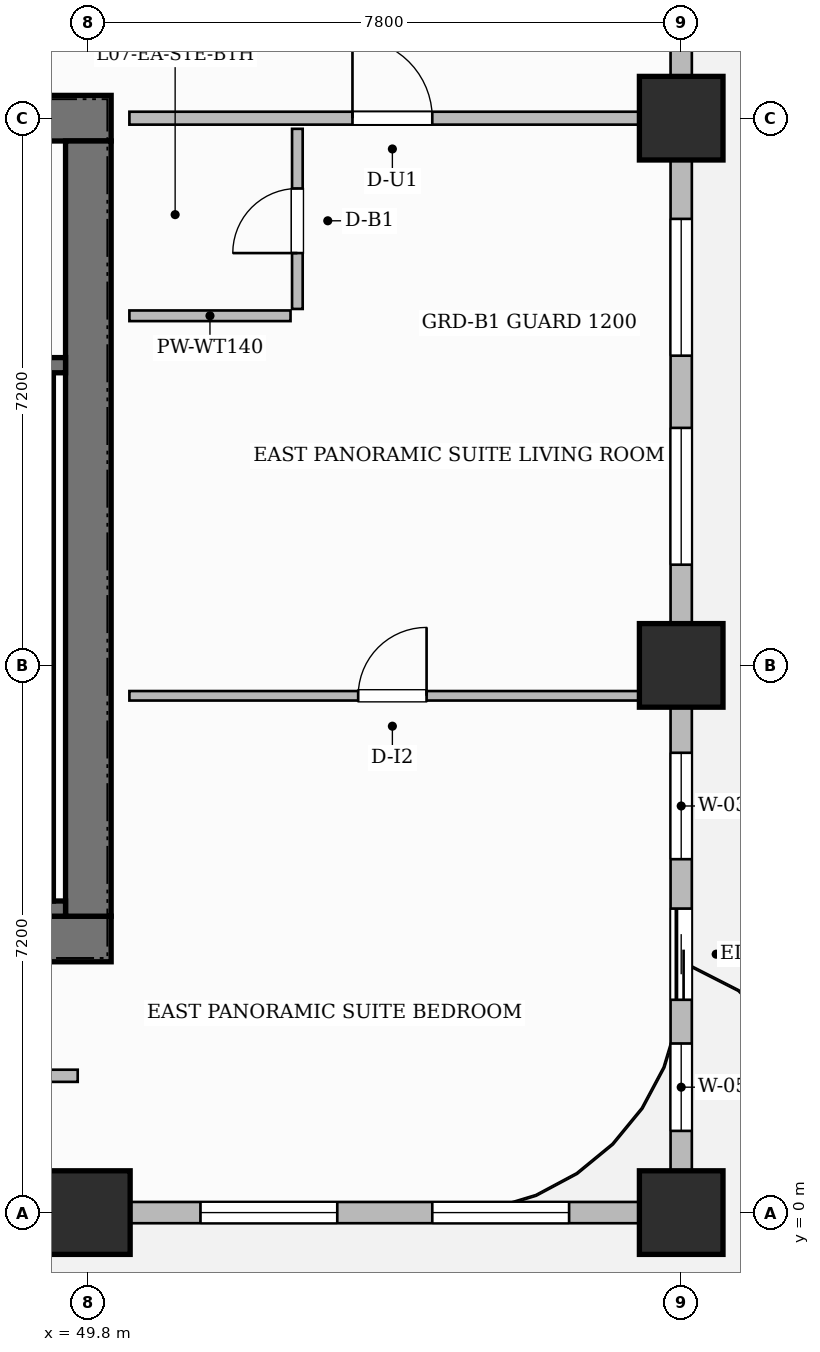
"""IFC4 building model, lengths in metres.
Left out: names, types, materials, properties, quantities, classifications, styles, units other than length and angle.
Written with IfcOpenShell. Run it as: python <this file> out.ifc"""

import sys

from ifc_helpers import new_model, si_unit, direction, frame, frame_2d, origin, origin_2d, place, context, subcontext, project, spatial, rectangle, extrude, source, transform, mapped, element, fill, save


model = new_model("IFC4")
c1 = context("Model", 3, precision=1e-05, world=origin(), true_north=direction((0.0, 1.0)))
c2 = subcontext(c1, "Body", "Model", "MODEL_VIEW")
j1 = project(units=[si_unit("LENGTHUNIT", "METRE"), si_unit("PLANEANGLEUNIT", "RADIAN")], contexts=[c1])
p1 = place(None, origin())
s1 = spatial("IfcSite", under=j1, at=p1, CompositionType="ELEMENT")
p2 = place(p1, origin())
s2 = spatial("IfcBuilding", under=s1, at=p2, CompositionType="ELEMENT")
p3 = place(p2, frame((0.0, 0.0, 36.1)))
s3 = spatial("IfcBuildingStorey", under=s2, at=p3, CompositionType="ELEMENT", Elevation=36.1)
p4 = place(p3, frame((34.5, 3.6, 0.0), z_axis=(0.0, 0.0, 1.0), x_axis=(1.0, 0.0, 0.0)))
e1 = element("IfcWall", 1, at=p4, inside=s3, PredefinedType="SHEAR", context=c2, shape_type="SweptSolid", body=[
    extrude(rectangle(XDim=15.6, YDim=0.6, at=frame_2d((7.8, 0.0))), origin(), (0.0, 0.0, 1.0), 3.7),
])
p5 = place(p4, frame((4.13, 0.0, 0.0)))
e2 = element("IfcOpeningElement", 2, at=p5, cuts=e1, PredefinedType="OPENING", context=c2, shape_type="SweptSolid", body=[
    extrude(rectangle(XDim=0.9, YDim=2.1, at=frame_2d((0.45, 1.05))), frame((0.0, 0.31, 0.0), z_axis=(0.0, -1.0, 0.0), x_axis=(1.0, 0.0, 0.0)), (0.0, 0.0, 1.0), 0.62),
])
p6 = place(p4, frame((5.7, 0.0, 0.0)))
e3 = element("IfcOpeningElement", 3, at=p6, cuts=e1, PredefinedType="OPENING", context=c2, shape_type="SweptSolid", body=[
    extrude(rectangle(XDim=0.9, YDim=2.1, at=frame_2d((0.45, 1.05))), frame((0.0, 0.31, 0.0), z_axis=(0.0, -1.0, 0.0), x_axis=(1.0, 0.0, 0.0)), (0.0, 0.0, 1.0), 0.62),
])
p7 = place(p4, frame((7.3, 0.0, 0.0)))
e4 = element("IfcOpeningElement", 4, at=p7, cuts=e1, PredefinedType="OPENING", context=c2, shape_type="SweptSolid", body=[
    extrude(rectangle(XDim=0.9, YDim=2.1, at=frame_2d((0.45, 1.05))), frame((0.0, 0.31, 0.0), z_axis=(0.0, -1.0, 0.0), x_axis=(1.0, 0.0, 0.0)), (0.0, 0.0, 1.0), 0.62),
])
p8 = place(p3, frame((34.5, 14.4, 0.0), z_axis=(0.0, 0.0, 1.0), x_axis=(1.0, 0.0, 0.0)))
e5 = element("IfcWall", 5, at=p8, inside=s3, PredefinedType="SHEAR", context=c2, shape_type="SweptSolid", body=[
    extrude(rectangle(XDim=15.6, YDim=0.6, at=frame_2d((7.8, 0.0))), origin(), (0.0, 0.0, 1.0), 3.7),
])
p9 = place(p8, frame((5.43, 0.0, 0.0)))
e6 = element("IfcOpeningElement", 6, at=p9, cuts=e5, PredefinedType="OPENING", context=c2, shape_type="SweptSolid", body=[
    extrude(rectangle(XDim=1.5, YDim=2.2, at=frame_2d((0.75, 1.1))), frame((0.0, 0.31, 0.0), z_axis=(0.0, -1.0, 0.0), x_axis=(1.0, 0.0, 0.0)), (0.0, 0.0, 1.0), 0.62),
])
p10 = place(p8, frame((1.645, 0.0, 0.0)))
e7 = element("IfcOpeningElement", 7, at=p10, cuts=e5, PredefinedType="OPENING", context=c2, shape_type="SweptSolid", body=[
    extrude(rectangle(XDim=1.05, YDim=2.15, at=frame_2d((0.525, 1.075))), frame((0.0, 0.31, 0.0), z_axis=(0.0, -1.0, 0.0), x_axis=(1.0, 0.0, 0.0)), (0.0, 0.0, 1.0), 0.62),
])
p11 = place(p8, frame((11.275, 0.0, 0.0)))
e8 = element("IfcOpeningElement", 8, at=p11, cuts=e5, PredefinedType="OPENING", context=c2, shape_type="SweptSolid", body=[
    extrude(rectangle(XDim=1.05, YDim=2.15, at=frame_2d((0.525, 1.075))), frame((0.0, 0.31, 0.0), z_axis=(0.0, -1.0, 0.0), x_axis=(1.0, 0.0, 0.0)), (0.0, 0.0, 1.0), 0.62),
])
p12 = place(p3, frame((49.8, 3.9, 0.0), z_axis=(0.0, 0.0, 1.0), x_axis=(0.0, 1.0, 0.0)))
e9 = element("IfcWall", 9, at=p12, inside=s3, PredefinedType="SHEAR", context=c2, shape_type="SweptSolid", body=[
    extrude(rectangle(XDim=10.2, YDim=0.6, at=frame_2d((5.1, 0.0))), origin(), (0.0, 0.0, 1.0), 3.7),
])
m1 = source(origin(), c2, "Body", "SweptSolid", [
    extrude(rectangle(XDim=1.1, YDim=1.1, at=origin_2d()), origin(), (0.0, 0.0, 1.0), 3.7),
])
for number, where, z_axis, x_axis in (
    (10, (49.8, 0.0, 0.0), (0.0, 0.0, 1.0), (1.0, 0.0, 0.0)),
    (11, (57.6, 0.0, 0.0), (0.0, 0.0, 1.0), (1.0, 0.0, 0.0)),
    (12, (57.6, 7.2, 0.0), (0.0, 0.0, 1.0), (1.0, 0.0, 0.0)),
    (13, (57.6, 14.4, 0.0), (0.0, 0.0, 1.0), (1.0, 0.0, 0.0)),
):
    element("IfcColumn", number, at=place(p3, frame(where, z_axis=z_axis, x_axis=x_axis)), inside=s3, PredefinedType="COLUMN", context=c2, shape_type="MappedRepresentation", body=[
        mapped(m1, transform((0.0, 0.0, 0.0), scale=1.0)),
    ])
p13 = place(p3, frame((43.12, 4.0, 0.0), z_axis=(0.0, 0.0, 1.0), x_axis=(1.0, 0.0, 0.0)))
e14 = element("IfcWall", 14, at=p13, inside=s3, PredefinedType="SHEAR", context=c2, shape_type="SweptSolid", body=[
    extrude(rectangle(XDim=6.38, YDim=0.2, at=frame_2d((3.19, 0.0))), origin(), (0.0, 0.0, 1.0), 3.7),
])
p14 = place(p3, frame((49.24, 4.1, 0.0), z_axis=(0.0, 0.0, 1.0), x_axis=(0.0, 1.0, 0.0)))
e15 = element("IfcWall", 15, at=p14, inside=s3, PredefinedType="SHEAR", context=c2, shape_type="SweptSolid", body=[
    extrude(rectangle(XDim=6.95, YDim=0.2, at=frame_2d((3.475, 0.0))), origin(), (0.0, 0.0, 1.0), 3.7),
])
p15 = place(p3, frame((43.12, 11.15, 0.0), z_axis=(0.0, 0.0, 1.0), x_axis=(1.0, 0.0, 0.0)))
e16 = element("IfcWall", 16, at=p15, inside=s3, PredefinedType="SHEAR", context=c2, shape_type="SweptSolid", body=[
    extrude(rectangle(XDim=6.38, YDim=0.2, at=frame_2d((3.19, 0.0))), origin(), (0.0, 0.0, 1.0), 3.7),
])
p16 = place(p15, frame((1.045, 0.0, 0.0)))
e17 = element("IfcOpeningElement", 17, at=p16, cuts=e16, PredefinedType="OPENING", context=c2, shape_type="SweptSolid", body=[
    extrude(rectangle(XDim=1.05, YDim=2.2, at=frame_2d((0.525, 1.1))), frame((0.0, 0.11, 0.0), z_axis=(0.0, -1.0, 0.0), x_axis=(1.0, 0.0, 0.0)), (0.0, 0.0, 1.0), 0.22),
])
p17 = place(p15, frame((4.125, 0.0, 0.0)))
e18 = element("IfcOpeningElement", 18, at=p17, cuts=e16, PredefinedType="OPENING", context=c2, shape_type="SweptSolid", body=[
    extrude(rectangle(XDim=1.05, YDim=2.2, at=frame_2d((0.525, 1.1))), frame((0.0, 0.11, 0.0), z_axis=(0.0, -1.0, 0.0), x_axis=(1.0, 0.0, 0.0)), (0.0, 0.0, 1.0), 0.22),
])
p18 = place(p3, frame((30.29, 1.8, 0.0), z_axis=(0.0, 0.0, 1.0), x_axis=(1.0, 0.0, 0.0)))
e19 = element("IfcWall", 19, at=p18, inside=s3, PredefinedType="PARTITIONING", context=c2, shape_type="SweptSolid", body=[
    extrude(rectangle(XDim=19.37, YDim=0.16, at=frame_2d((9.685, 0.0))), origin(), (0.0, 0.0, 1.0), 3.45),
])
p19 = place(p18, frame((9.735, 0.0, 0.0)))
e20 = element("IfcOpeningElement", 20, at=p19, cuts=e19, PredefinedType="OPENING", context=c2, shape_type="SweptSolid", body=[
    extrude(rectangle(XDim=0.95, YDim=2.15, at=frame_2d((0.475, 1.075))), frame((0.0, 0.09, 0.0), z_axis=(0.0, -1.0, 0.0), x_axis=(1.0, 0.0, 0.0)), (0.0, 0.0, 1.0), 0.18),
])
p20 = place(p3, frame((50.34, 14.4, 0.0), z_axis=(0.0, 0.0, 1.0), x_axis=(1.0, 0.0, 0.0)))
e21 = element("IfcWall", 21, at=p20, inside=s3, PredefinedType="PARTITIONING", context=c2, shape_type="SweptSolid", body=[
    extrude(rectangle(XDim=7.07, YDim=0.17, at=frame_2d((3.535, 0.0))), origin(), (0.0, 0.0, 1.0), 2.885),
])
p21 = place(p20, frame((2.935, 0.0, 0.0)))
e22 = element("IfcOpeningElement", 22, at=p21, cuts=e21, PredefinedType="OPENING", context=c2, shape_type="SweptSolid", body=[
    extrude(rectangle(XDim=1.05, YDim=2.25, at=frame_2d((0.525, 1.125))), frame((0.0, 0.095, 0.0), z_axis=(0.0, -1.0, 0.0), x_axis=(1.0, 0.0, 0.0)), (0.0, 0.0, 1.0), 0.19),
])
p22 = place(p3, frame((52.55, 11.89, 0.0), z_axis=(0.0, 0.0, 1.0), x_axis=(0.0, 1.0, 0.0)))
e23 = element("IfcWall", 23, at=p22, inside=s3, PredefinedType="PARTITIONING", context=c2, shape_type="SweptSolid", body=[
    extrude(rectangle(XDim=2.37, YDim=0.14, at=frame_2d((1.185, 0.0))), origin(), (0.0, 0.0, 1.0), 3.45),
])
p23 = place(p22, frame((0.735, 0.0, 0.0)))
e24 = element("IfcOpeningElement", 24, at=p23, cuts=e23, PredefinedType="OPENING", context=c2, shape_type="SweptSolid", body=[
    extrude(rectangle(XDim=0.85, YDim=2.1, at=frame_2d((0.425, 1.05))), frame((0.0, 0.08, 0.0), z_axis=(0.0, -1.0, 0.0), x_axis=(1.0, 0.0, 0.0)), (0.0, 0.0, 1.0), 0.16),
])
p24 = place(p3, frame((50.34, 11.8, 0.0), z_axis=(0.0, 0.0, 1.0), x_axis=(1.0, 0.0, 0.0)))
e25 = element("IfcWall", 25, at=p24, inside=s3, PredefinedType="PARTITIONING", context=c2, shape_type="SweptSolid", body=[
    extrude(rectangle(XDim=2.12, YDim=0.14, at=frame_2d((1.06, 0.0))), origin(), (0.0, 0.0, 1.0), 3.45),
])
p25 = place(p3, frame((50.34, 6.8, 0.0), z_axis=(0.0, 0.0, 1.0), x_axis=(1.0, 0.0, 0.0)))
e26 = element("IfcWall", 26, at=p25, inside=s3, PredefinedType="PARTITIONING", context=c2, shape_type="SweptSolid", body=[
    extrude(rectangle(XDim=7.07, YDim=0.125, at=frame_2d((3.535, 0.0))), origin(), (0.0, 0.0, 1.0), 3.45),
])
p26 = place(p25, frame((3.01, 0.0, 0.0)))
e27 = element("IfcOpeningElement", 27, at=p26, cuts=e26, PredefinedType="OPENING", context=c2, shape_type="SweptSolid", body=[
    extrude(rectangle(XDim=0.9, YDim=2.15, at=frame_2d((0.45, 1.075))), frame((0.0, 0.073, 0.0), z_axis=(0.0, -1.0, 0.0), x_axis=(1.0, 0.0, 0.0)), (0.0, 0.0, 1.0), 0.145),
])
p27 = place(p3, frame((14.4, 0.0, 0.0), z_axis=(0.0, 0.0, 1.0), x_axis=(1.0, 0.0, 0.0)))
e28 = element("IfcWall", 28, at=p27, inside=s3, PredefinedType="SOLIDWALL", context=c2, shape_type="SweptSolid", body=[
    extrude(rectangle(XDim=43.2, YDim=0.28, at=frame_2d((21.6, 0.0))), origin(), (0.0, 0.0, 1.0), 2.885),
])
p28 = place(p27, frame((1.5, 0.0, 0.0)))
e29 = element("IfcOpeningElement", 29, at=p28, cuts=e28, PredefinedType="OPENING", context=c2, shape_type="SweptSolid", body=[
    extrude(rectangle(XDim=1.2, YDim=2.2, at=frame_2d((0.6, 1.1))), frame((0.0, 0.15, 0.0), z_axis=(0.0, -1.0, 0.0), x_axis=(1.0, 0.0, 0.0)), (0.0, 0.0, 1.0), 0.3),
])
p29 = place(p27, frame((3.336, 0.0, 0.8)))
e30 = element("IfcOpeningElement", 30, at=p29, cuts=e28, PredefinedType="OPENING", context=c2, shape_type="SweptSolid", body=[
    extrude(rectangle(XDim=1.4, YDim=1.85, at=frame_2d((0.7, 0.925))), frame((0.0, 0.15, 0.0), z_axis=(0.0, -1.0, 0.0), x_axis=(1.0, 0.0, 0.0)), (0.0, 0.0, 1.0), 0.3),
])
p30 = place(p27, frame((5.269, 0.0, 0.8)))
e31 = element("IfcOpeningElement", 31, at=p30, cuts=e28, PredefinedType="OPENING", context=c2, shape_type="SweptSolid", body=[
    extrude(rectangle(XDim=0.95, YDim=1.75, at=frame_2d((0.475, 0.875))), frame((0.0, 0.15, 0.0), z_axis=(0.0, -1.0, 0.0), x_axis=(1.0, 0.0, 0.0)), (0.0, 0.0, 1.0), 0.3),
])
p31 = place(p27, frame((8.389, 0.0, 0.8)))
e32 = element("IfcOpeningElement", 32, at=p31, cuts=e28, PredefinedType="OPENING", context=c2, shape_type="SweptSolid", body=[
    extrude(rectangle(XDim=1.8, YDim=1.85, at=frame_2d((0.9, 0.925))), frame((0.0, 0.15, 0.0), z_axis=(0.0, -1.0, 0.0), x_axis=(1.0, 0.0, 0.0)), (0.0, 0.0, 1.0), 0.3),
])
p32 = place(p27, frame((11.197, 0.0, 0.8)))
e33 = element("IfcOpeningElement", 33, at=p32, cuts=e28, PredefinedType="OPENING", context=c2, shape_type="SweptSolid", body=[
    extrude(rectangle(XDim=1.8, YDim=1.85, at=frame_2d((0.9, 0.925))), frame((0.0, 0.15, 0.0), z_axis=(0.0, -1.0, 0.0), x_axis=(1.0, 0.0, 0.0)), (0.0, 0.0, 1.0), 0.3),
])
p33 = place(p27, frame((16.804, 0.0, 0.8)))
e34 = element("IfcOpeningElement", 34, at=p33, cuts=e28, PredefinedType="OPENING", context=c2, shape_type="SweptSolid", body=[
    extrude(rectangle(XDim=1.8, YDim=1.85, at=frame_2d((0.9, 0.925))), frame((0.0, 0.15, 0.0), z_axis=(0.0, -1.0, 0.0), x_axis=(1.0, 0.0, 0.0)), (0.0, 0.0, 1.0), 0.3),
])
p34 = place(p27, frame((21.725, 0.0, 0.8)))
e35 = element("IfcOpeningElement", 35, at=p34, cuts=e28, PredefinedType="OPENING", context=c2, shape_type="SweptSolid", body=[
    extrude(rectangle(XDim=1.8, YDim=1.85, at=frame_2d((0.9, 0.925))), frame((0.0, 0.15, 0.0), z_axis=(0.0, -1.0, 0.0), x_axis=(1.0, 0.0, 0.0)), (0.0, 0.0, 1.0), 0.3),
])
p35 = place(p27, frame((24.475, 0.0, 0.8)))
e36 = element("IfcOpeningElement", 36, at=p35, cuts=e28, PredefinedType="OPENING", context=c2, shape_type="SweptSolid", body=[
    extrude(rectangle(XDim=1.8, YDim=1.85, at=frame_2d((0.9, 0.925))), frame((0.0, 0.15, 0.0), z_axis=(0.0, -1.0, 0.0), x_axis=(1.0, 0.0, 0.0)), (0.0, 0.0, 1.0), 0.3),
])
p36 = place(p27, frame((29.075, 0.0, 0.8)))
e37 = element("IfcOpeningElement", 37, at=p36, cuts=e28, PredefinedType="OPENING", context=c2, shape_type="SweptSolid", body=[
    extrude(rectangle(XDim=1.8, YDim=1.85, at=frame_2d((0.9, 0.925))), frame((0.0, 0.15, 0.0), z_axis=(0.0, -1.0, 0.0), x_axis=(1.0, 0.0, 0.0)), (0.0, 0.0, 1.0), 0.3),
])
p37 = place(p27, frame((32.125, 0.0, 0.8)))
e38 = element("IfcOpeningElement", 38, at=p37, cuts=e28, PredefinedType="OPENING", context=c2, shape_type="SweptSolid", body=[
    extrude(rectangle(XDim=1.8, YDim=1.85, at=frame_2d((0.9, 0.925))), frame((0.0, 0.15, 0.0), z_axis=(0.0, -1.0, 0.0), x_axis=(1.0, 0.0, 0.0)), (0.0, 0.0, 1.0), 0.3),
])
p38 = place(p27, frame((36.875, 0.0, 0.8)))
e39 = element("IfcOpeningElement", 39, at=p38, cuts=e28, PredefinedType="OPENING", context=c2, shape_type="SweptSolid", body=[
    extrude(rectangle(XDim=1.8, YDim=1.85, at=frame_2d((0.9, 0.925))), frame((0.0, 0.15, 0.0), z_axis=(0.0, -1.0, 0.0), x_axis=(1.0, 0.0, 0.0)), (0.0, 0.0, 1.0), 0.3),
])
p39 = place(p27, frame((39.925, 0.0, 0.8)))
e40 = element("IfcOpeningElement", 40, at=p39, cuts=e28, PredefinedType="OPENING", context=c2, shape_type="SweptSolid", body=[
    extrude(rectangle(XDim=1.8, YDim=1.85, at=frame_2d((0.9, 0.925))), frame((0.0, 0.15, 0.0), z_axis=(0.0, -1.0, 0.0), x_axis=(1.0, 0.0, 0.0)), (0.0, 0.0, 1.0), 0.3),
])
p40 = place(p3, frame((57.6, 0.05, 0.0), z_axis=(0.0, 0.0, 1.0), x_axis=(0.0, 1.0, 0.0)))
e41 = element("IfcWall", 41, at=p40, inside=s3, PredefinedType="SOLIDWALL", context=c2, shape_type="SweptSolid", body=[
    extrude(rectangle(XDim=21.5, YDim=0.28, at=frame_2d((10.75, 0.0))), origin(), (0.0, 0.0, 1.0), 2.885),
])
p41 = place(p40, frame((2.75, 0.0, 0.0)))
e42 = element("IfcOpeningElement", 42, at=p41, cuts=e41, PredefinedType="OPENING", context=c2, shape_type="SweptSolid", body=[
    extrude(rectangle(XDim=1.2, YDim=2.2, at=frame_2d((0.6, 1.1))), frame((0.0, 0.15, 0.0), z_axis=(0.0, -1.0, 0.0), x_axis=(1.0, 0.0, 0.0)), (0.0, 0.0, 1.0), 0.3),
])
p42 = place(p40, frame((1.025, 0.0, 0.8)))
e43 = element("IfcOpeningElement", 43, at=p42, cuts=e41, PredefinedType="OPENING", context=c2, shape_type="SweptSolid", body=[
    extrude(rectangle(XDim=1.15, YDim=1.8, at=frame_2d((0.575, 0.9))), frame((0.0, 0.15, 0.0), z_axis=(0.0, -1.0, 0.0), x_axis=(1.0, 0.0, 0.0)), (0.0, 0.0, 1.0), 0.3),
])
p43 = place(p40, frame((4.6, 0.0, 0.8)))
e44 = element("IfcOpeningElement", 44, at=p43, cuts=e41, PredefinedType="OPENING", context=c2, shape_type="SweptSolid", body=[
    extrude(rectangle(XDim=1.4, YDim=1.85, at=frame_2d((0.7, 0.925))), frame((0.0, 0.15, 0.0), z_axis=(0.0, -1.0, 0.0), x_axis=(1.0, 0.0, 0.0)), (0.0, 0.0, 1.0), 0.3),
])
p44 = place(p40, frame((8.475, 0.0, 0.8)))
e45 = element("IfcOpeningElement", 45, at=p44, cuts=e41, PredefinedType="OPENING", context=c2, shape_type="SweptSolid", body=[
    extrude(rectangle(XDim=1.8, YDim=1.85, at=frame_2d((0.9, 0.925))), frame((0.0, 0.15, 0.0), z_axis=(0.0, -1.0, 0.0), x_axis=(1.0, 0.0, 0.0)), (0.0, 0.0, 1.0), 0.3),
])
p45 = place(p40, frame((11.225, 0.0, 0.8)))
e46 = element("IfcOpeningElement", 46, at=p45, cuts=e41, PredefinedType="OPENING", context=c2, shape_type="SweptSolid", body=[
    extrude(rectangle(XDim=1.8, YDim=1.85, at=frame_2d((0.9, 0.925))), frame((0.0, 0.15, 0.0), z_axis=(0.0, -1.0, 0.0), x_axis=(1.0, 0.0, 0.0)), (0.0, 0.0, 1.0), 0.3),
])
p46 = place(p40, frame((17.679, 0.0, 0.8)))
e47 = element("IfcOpeningElement", 47, at=p46, cuts=e41, PredefinedType="OPENING", context=c2, shape_type="SweptSolid", body=[
    extrude(rectangle(XDim=1.8, YDim=1.85, at=frame_2d((0.9, 0.925))), frame((0.0, 0.15, 0.0), z_axis=(0.0, -1.0, 0.0), x_axis=(1.0, 0.0, 0.0)), (0.0, 0.0, 1.0), 0.3),
])
m2 = source(origin(), c2, "Body", "SweptSolid", [
    extrude(rectangle(XDim=1.05, YDim=2.25, at=frame_2d((0.525, 1.125))), frame((0.0, 0.025, 0.0), z_axis=(0.0, -1.0, 0.0), x_axis=(1.0, 0.0, 0.0)), (0.0, 0.0, 1.0), 0.05),
])
p47 = place(p21, origin())
e48 = element("IfcDoor", 48, at=p47, inside=s3, OperationType="SINGLE_SWING_LEFT", PredefinedType="DOOR", context=c2, shape_type="MappedRepresentation", body=[
    mapped(m2, transform((0.0, 0.0, 0.0), scale=1.0)),
])
fill(e22, e48)
m3 = source(origin(), c2, "Body", "SweptSolid", [
    extrude(rectangle(XDim=0.85, YDim=2.1, at=frame_2d((0.425, 1.05))), frame((0.0, 0.025, 0.0), z_axis=(0.0, -1.0, 0.0), x_axis=(1.0, 0.0, 0.0)), (0.0, 0.0, 1.0), 0.05),
])
p48 = place(p23, origin())
e49 = element("IfcDoor", 49, at=p48, inside=s3, OperationType="SINGLE_SWING_LEFT", PredefinedType="DOOR", context=c2, shape_type="MappedRepresentation", body=[
    mapped(m3, transform((0.0, 0.0, 0.0), scale=1.0)),
])
fill(e24, e49)
m4 = source(origin(), c2, "Body", "SweptSolid", [
    extrude(rectangle(XDim=0.9, YDim=2.15, at=frame_2d((0.45, 1.075))), frame((0.0, 0.025, 0.0), z_axis=(0.0, -1.0, 0.0), x_axis=(1.0, 0.0, 0.0)), (0.0, 0.0, 1.0), 0.05),
])
p49 = place(p26, origin())
e50 = element("IfcDoor", 50, at=p49, inside=s3, OperationType="SINGLE_SWING_RIGHT", PredefinedType="DOOR", context=c2, shape_type="MappedRepresentation", body=[
    mapped(m4, transform((0.0, 0.0, 0.0), scale=1.0)),
])
fill(e27, e50)
m5 = source(origin(), c2, "Body", "SweptSolid", [
    extrude(rectangle(XDim=1.2, YDim=2.2, at=frame_2d((0.6, 1.1))), frame((0.0, 0.025, 0.0), z_axis=(0.0, -1.0, 0.0), x_axis=(1.0, 0.0, 0.0)), (0.0, 0.0, 1.0), 0.05),
])
p50 = place(p41, origin())
e51 = element("IfcDoor", 51, at=p50, inside=s3, OperationType="SLIDING_TO_LEFT", PredefinedType="DOOR", context=c2, shape_type="MappedRepresentation", body=[
    mapped(m5, transform((0.0, 0.0, 0.0), scale=1.0)),
])
fill(e42, e51)
m6 = source(origin(), c2, "Body", "SweptSolid", [
    extrude(rectangle(XDim=1.8, YDim=1.85, at=frame_2d((0.9, 0.925))), frame((0.0, 0.03, 0.0), z_axis=(0.0, -1.0, 0.0), x_axis=(1.0, 0.0, 0.0)), (0.0, 0.0, 1.0), 0.06),
])
p51 = place(p38, origin())
e52 = element("IfcWindow", 52, at=p51, inside=s3, PartitioningType="DOUBLE_PANEL_VERTICAL", PredefinedType="WINDOW", context=c2, shape_type="MappedRepresentation", body=[
    mapped(m6, transform((0.0, 0.0, 0.0), scale=1.0)),
])
fill(e39, e52)
p52 = place(p39, origin())
e53 = element("IfcWindow", 53, at=p52, inside=s3, PartitioningType="DOUBLE_PANEL_VERTICAL", PredefinedType="WINDOW", context=c2, shape_type="MappedRepresentation", body=[
    mapped(m6, transform((0.0, 0.0, 0.0), scale=1.0)),
])
fill(e40, e53)
m7 = source(origin(), c2, "Body", "SweptSolid", [
    extrude(rectangle(XDim=1.15, YDim=1.8, at=frame_2d((0.575, 0.9))), frame((0.0, 0.03, 0.0), z_axis=(0.0, -1.0, 0.0), x_axis=(1.0, 0.0, 0.0)), (0.0, 0.0, 1.0), 0.06),
])
p53 = place(p42, origin())
e54 = element("IfcWindow", 54, at=p53, inside=s3, PartitioningType="SINGLE_PANEL", PredefinedType="WINDOW", context=c2, shape_type="MappedRepresentation", body=[
    mapped(m7, transform((0.0, 0.0, 0.0), scale=1.0)),
])
fill(e43, e54)
m8 = source(origin(), c2, "Body", "SweptSolid", [
    extrude(rectangle(XDim=1.4, YDim=1.85, at=frame_2d((0.7, 0.925))), frame((0.0, 0.03, 0.0), z_axis=(0.0, -1.0, 0.0), x_axis=(1.0, 0.0, 0.0)), (0.0, 0.0, 1.0), 0.06),
])
p54 = place(p43, origin())
e55 = element("IfcWindow", 55, at=p54, inside=s3, PartitioningType="SINGLE_PANEL", PredefinedType="WINDOW", context=c2, shape_type="MappedRepresentation", body=[
    mapped(m8, transform((0.0, 0.0, 0.0), scale=1.0)),
])
fill(e44, e55)
p55 = place(p44, origin())
e56 = element("IfcWindow", 56, at=p55, inside=s3, PartitioningType="DOUBLE_PANEL_VERTICAL", PredefinedType="WINDOW", context=c2, shape_type="MappedRepresentation", body=[
    mapped(m6, transform((0.0, 0.0, 0.0), scale=1.0)),
])
fill(e45, e56)
p56 = place(p45, origin())
e57 = element("IfcWindow", 57, at=p56, inside=s3, PartitioningType="DOUBLE_PANEL_VERTICAL", PredefinedType="WINDOW", context=c2, shape_type="MappedRepresentation", body=[
    mapped(m6, transform((0.0, 0.0, 0.0), scale=1.0)),
])
fill(e46, e57)
save(model, sys.argv[1])
